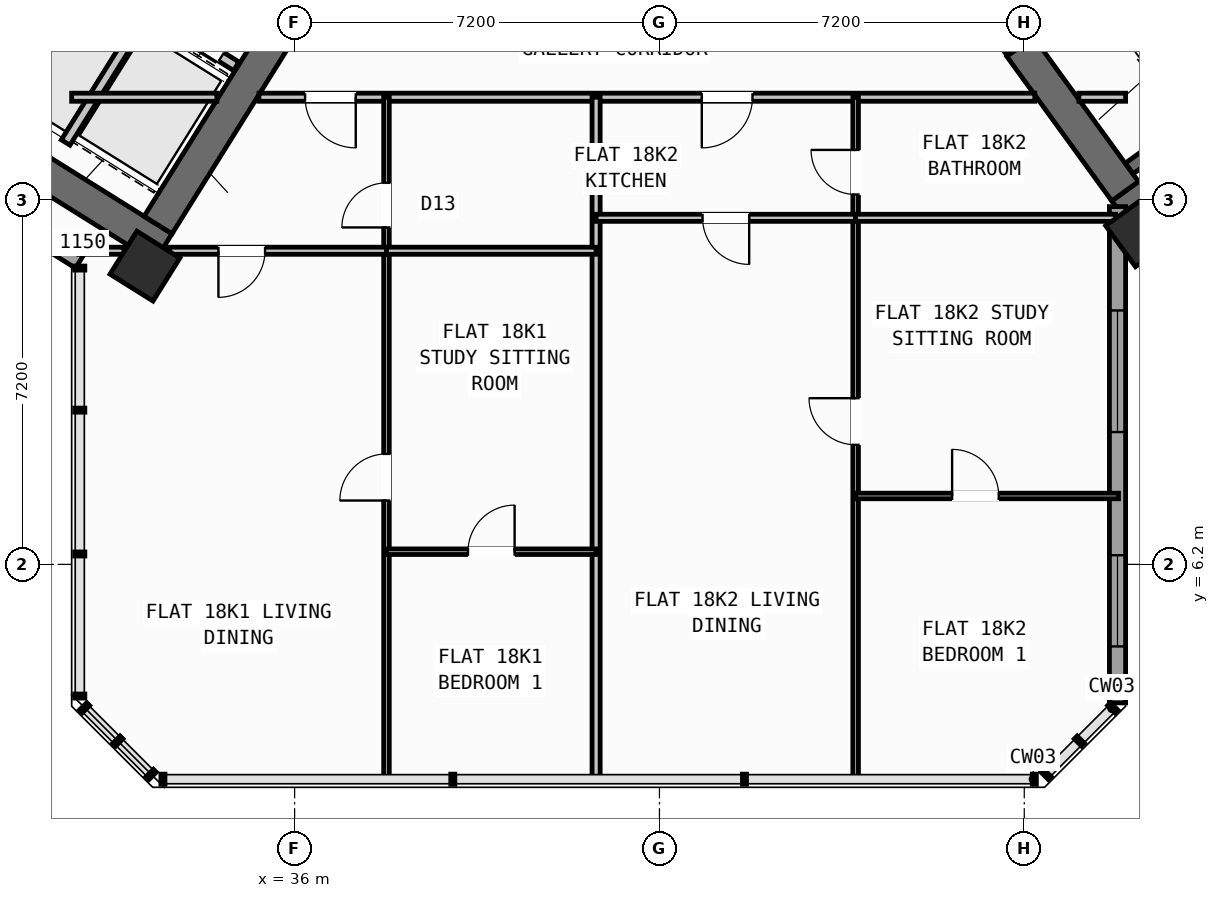
"""IFC4 building model, lengths in metres.
Left out: names, types, materials, properties, quantities, classifications, styles, units other than length and angle.
Written with IfcOpenShell. Run it as: python <this file> out.ifc"""

import sys

from ifc_helpers import new_model, si_unit, direction, frame, frame_2d, origin, origin_2d, place, context, subcontext, project, spatial, rectangle, hollow_rectangle, extrude, source, transform, mapped, element, fill, save


model = new_model("IFC4")
c1 = context("Model", 3, precision=1e-05, world=origin(), true_north=direction((0.0, 1.0)))
c2 = subcontext(c1, "Body", "Model", "MODEL_VIEW")
j1 = project(units=[si_unit("LENGTHUNIT", "METRE"), si_unit("PLANEANGLEUNIT", "RADIAN")], contexts=[c1])
p1 = place(None, origin())
s1 = spatial("IfcSite", under=j1, at=p1, CompositionType="ELEMENT")
p2 = place(p1, origin())
s2 = spatial("IfcBuilding", under=s1, at=p2, CompositionType="ELEMENT")
p3 = place(p2, frame((0.0, 0.0, 71.7)))
s3 = spatial("IfcBuildingStorey", under=s2, at=p3, CompositionType="ELEMENT", Elevation=71.7)
p4 = place(p3, frame((33.409, 12.45, 0.0), z_axis=(0.0, 0.0, 1.0), x_axis=(-0.848051132073, 0.529914405721, 0.0)))
e1 = element("IfcWall", 1, at=p4, inside=s3, PredefinedType="SHEAR", context=c2, shape_type="SweptSolid", body=[
    extrude(rectangle(XDim=13.24, YDim=0.65, at=frame_2d((6.62, 0.0))), origin(), (0.0, 0.0, 1.0), 4.52),
])
p5 = place(p3, frame((36.683, 18.304, 0.0), z_axis=(0.0, 0.0, 1.0), x_axis=(-0.529899109053, -0.848060690178, 0.0)))
e2 = element("IfcWall", 2, at=p5, inside=s3, PredefinedType="SHEAR", context=c2, shape_type="SweptSolid", body=[
    extrude(rectangle(XDim=6.375, YDim=0.65, at=frame_2d((3.188, 0.0))), origin(), (0.0, 0.0, 1.0), 4.52),
])
p6 = place(p3, frame((52.318, 13.11, 0.0), z_axis=(0.0, 0.0, 1.0), x_axis=(0.809019445368, 0.587781878776, 0.0)))
e3 = element("IfcWall", 3, at=p6, inside=s3, PredefinedType="SHEAR", context=c2, shape_type="SweptSolid", body=[
    extrude(rectangle(XDim=12.44, YDim=0.65, at=frame_2d((6.22, 0.0))), origin(), (0.0, 0.0, 1.0), 4.52),
])
p7 = place(p3, frame((52.39, 13.564, 0.0), z_axis=(0.0, 0.0, 1.0), x_axis=(-0.58779688989, 0.809008539037, 0.0)))
e4 = element("IfcWall", 4, at=p7, inside=s3, PredefinedType="SHEAR", context=c2, shape_type="SweptSolid", body=[
    extrude(rectangle(XDim=3.525, YDim=0.65, at=frame_2d((1.763, 0.0))), origin(), (0.0, 0.0, 1.0), 4.52),
])
m1 = source(origin(), c2, "Body", "SweptSolid", [
    extrude(hollow_rectangle(XDim=1.0, YDim=1.0, WallThickness=0.04, at=origin_2d()), origin(), (0.0, 0.0, 1.0), 4.8),
])
for number, where, z_axis, x_axis in (
    (5, (33.046, 12.087, 0.0), (0.0, 0.0, 1.0), (-0.848, 0.53, 0.0)),
    (6, (52.705, 12.773, 0.0), (0.0, 0.0, 1.0), (0.809, 0.588, 0.0)),
):
    element("IfcColumn", number, at=place(p3, frame(where, z_axis=z_axis, x_axis=x_axis)), inside=s3, PredefinedType="COLUMN", context=c2, shape_type="MappedRepresentation", body=[
        mapped(m1, transform((0.0, 0.0, 0.0), scale=1.0)),
    ])
p8 = place(p3, frame((31.76, 12.183, 0.0), z_axis=(0.0, 0.0, 1.0), x_axis=(-0.848047074256, 0.529920899612, 0.0)))
e7 = element("IfcWall", 7, at=p8, inside=s3, PredefinedType="STANDARD", context=c2, shape_type="SweptSolid", body=[
    extrude(rectangle(XDim=30.652, YDim=0.32, at=frame_2d((15.326, 0.0))), origin(), (0.0, 0.0, 1.0), 4.52),
])
p9 = place(p8, frame((20.241, 0.0, 0.0)))
e8 = element("IfcOpeningElement", 8, at=p9, cuts=e7, PredefinedType="OPENING", context=c2, shape_type="SweptSolid", body=[
    extrude(rectangle(XDim=1.2, YDim=2.15, at=frame_2d((0.6, 1.075))), frame((0.0, 0.17, 0.0), z_axis=(0.0, -1.0, 0.0), x_axis=(1.0, 0.0, 0.0)), (0.0, 0.0, 1.0), 0.34),
])
p10 = place(p8, frame((14.781, 0.0, 0.0)))
e9 = element("IfcOpeningElement", 9, at=p10, cuts=e7, PredefinedType="OPENING", context=c2, shape_type="SweptSolid", body=[
    extrude(rectangle(XDim=1.5, YDim=2.25, at=frame_2d((0.75, 1.125))), frame((0.0, 0.17, 0.0), z_axis=(0.0, -1.0, 0.0), x_axis=(1.0, 0.0, 0.0)), (0.0, 0.0, 1.0), 0.34),
])
p11 = place(p8, frame((1.84, 0.0, 0.75)))
e10 = element("IfcOpeningElement", 10, at=p11, cuts=e7, PredefinedType="OPENING", context=c2, shape_type="SweptSolid", body=[
    extrude(rectangle(XDim=2.4, YDim=1.6, at=frame_2d((1.2, 0.8))), frame((0.0, 0.17, 0.0), z_axis=(0.0, -1.0, 0.0), x_axis=(1.0, 0.0, 0.0)), (0.0, 0.0, 1.0), 0.34),
])
p12 = place(p8, frame((7.019, 0.0, 0.75)))
e11 = element("IfcOpeningElement", 11, at=p12, cuts=e7, PredefinedType="OPENING", context=c2, shape_type="SweptSolid", body=[
    extrude(rectangle(XDim=2.4, YDim=1.6, at=frame_2d((1.2, 0.8))), frame((0.0, 0.17, 0.0), z_axis=(0.0, -1.0, 0.0), x_axis=(1.0, 0.0, 0.0)), (0.0, 0.0, 1.0), 0.34),
])
p13 = place(p8, frame((25.841, 0.0, 0.95)))
e12 = element("IfcOpeningElement", 12, at=p13, cuts=e7, PredefinedType="OPENING", context=c2, shape_type="SweptSolid", body=[
    extrude(rectangle(XDim=1.2, YDim=1.4, at=frame_2d((0.6, 0.7))), frame((0.0, 0.17, 0.0), z_axis=(0.0, -1.0, 0.0), x_axis=(1.0, 0.0, 0.0)), (0.0, 0.0, 1.0), 0.34),
])
p14 = place(p3, frame((52.24, 13.261, 0.0), z_axis=(0.0, 0.0, 1.0), x_axis=(0.0, -1.0, 0.0)))
e13 = element("IfcWall", 13, at=p14, inside=s3, PredefinedType="STANDARD", context=c2, shape_type="SweptSolid", body=[
    extrude(rectangle(XDim=9.795, YDim=0.32, at=frame_2d((4.897, 0.0))), origin(), (0.0, 0.0, 1.0), 4.52),
])
p15 = place(p14, frame((2.049, 0.0, 0.75)))
e14 = element("IfcOpeningElement", 14, at=p15, cuts=e13, PredefinedType="OPENING", context=c2, shape_type="SweptSolid", body=[
    extrude(rectangle(XDim=2.4, YDim=1.6, at=frame_2d((1.2, 0.8))), frame((0.0, 0.17, 0.0), z_axis=(0.0, -1.0, 0.0), x_axis=(1.0, 0.0, 0.0)), (0.0, 0.0, 1.0), 0.34),
])
p16 = place(p14, frame((6.88, 0.0, 0.85)))
e15 = element("IfcOpeningElement", 15, at=p16, cuts=e13, PredefinedType="OPENING", context=c2, shape_type="SweptSolid", body=[
    extrude(rectangle(XDim=1.8, YDim=1.5, at=frame_2d((0.9, 0.75))), frame((0.0, 0.17, 0.0), z_axis=(0.0, -1.0, 0.0), x_axis=(1.0, 0.0, 0.0)), (0.0, 0.0, 1.0), 0.34),
])
p17 = place(p3, frame((31.288, 18.256, 0.0), z_axis=(0.0, 0.0, 1.0), x_axis=(-0.529943379326, -0.848033026897, 0.0)))
e16 = element("IfcWall", 16, at=p17, inside=s3, PredefinedType="SHEAR", context=c2, shape_type="SweptSolid", body=[
    extrude(rectangle(XDim=3.16, YDim=0.26, at=frame_2d((1.58, 0.0))), origin(), (0.0, 0.0, 1.0), 4.52),
])
p18 = place(p3, frame((34.848, 16.031, 0.0), z_axis=(0.0, 0.0, 1.0), x_axis=(-0.848044042236, 0.529925751807, 0.0)))
e17 = element("IfcWall", 17, at=p18, inside=s3, PredefinedType="STANDARD", context=c2, shape_type="SweptSolid", body=[
    extrude(rectangle(XDim=4.198, YDim=0.2, at=frame_2d((2.099, 0.0))), origin(), (0.0, 0.0, 1.0), 4.51),
])
p19 = place(p18, frame((0.348, 0.0, 0.0)))
e18 = element("IfcOpeningElement", 18, at=p19, cuts=e17, PredefinedType="OPENING", context=c2, shape_type="SweptSolid", body=[
    extrude(rectangle(XDim=1.3, YDim=2.2, at=frame_2d((0.65, 1.1))), frame((0.0, 0.11, 0.0), z_axis=(0.0, -1.0, 0.0), x_axis=(1.0, 0.0, 0.0)), (0.0, 0.0, 1.0), 0.22),
])
p20 = place(p18, frame((2.423, 0.0, 0.0)))
e19 = element("IfcOpeningElement", 19, at=p20, cuts=e17, PredefinedType="OPENING", context=c2, shape_type="SweptSolid", body=[
    extrude(rectangle(XDim=1.45, YDim=2.25, at=frame_2d((0.725, 1.125))), frame((0.0, 0.11, 0.0), z_axis=(0.0, -1.0, 0.0), x_axis=(1.0, 0.0, 0.0)), (0.0, 0.0, 1.0), 0.22),
])
p21 = place(p3, frame((33.029, 17.003, 0.0), z_axis=(0.0, 0.0, 1.0), x_axis=(-0.529916267533, -0.848049968695, 0.0)))
e20 = element("IfcWall", 20, at=p21, inside=s3, PredefinedType="STANDARD", context=c2, shape_type="SweptSolid", body=[
    extrude(rectangle(XDim=2.92, YDim=0.2, at=frame_2d((1.46, 0.0))), origin(), (0.0, 0.0, 1.0), 4.51),
])
p22 = place(p3, frame((52.472, 14.013, 0.0), z_axis=(0.0, 0.0, 1.0), x_axis=(0.809028366311, 0.587769599847, 0.0)))
e21 = element("IfcWall", 21, at=p22, inside=s3, PredefinedType="SHEAR", context=c2, shape_type="SweptSolid", body=[
    extrude(rectangle(XDim=7.33, YDim=0.26, at=frame_2d((3.665, 0.0))), origin(), (0.0, 0.0, 1.0), 4.52),
])
p23 = place(p3, frame((31.6, 15.42, 0.0), z_axis=(0.0, 0.0, 1.0), x_axis=(1.0, 0.0, 0.0)))
e22 = element("IfcWall", 22, at=p23, inside=s3, PredefinedType="PARTITIONING", context=c2, shape_type="SweptSolid", body=[
    extrude(rectangle(XDim=2.866, YDim=0.16, at=frame_2d((1.433, 0.0))), origin(), (0.0, 0.0, 1.0), 4.51),
])
p24 = place(p3, frame((35.296, 15.42, 0.0), z_axis=(0.0, 0.0, 1.0), x_axis=(1.0, 0.0, 0.0)))
e23 = element("IfcWall", 23, at=p24, inside=s3, PredefinedType="PARTITIONING", context=c2, shape_type="SweptSolid", body=[
    extrude(rectangle(XDim=15.311, YDim=0.16, at=frame_2d((7.655, 0.0))), origin(), (0.0, 0.0, 1.0), 4.51),
])
p25 = place(p24, frame((0.91, 0.0, 0.0)))
e24 = element("IfcOpeningElement", 24, at=p25, cuts=e23, PredefinedType="OPENING", context=c2, shape_type="SweptSolid", body=[
    extrude(rectangle(XDim=1.0, YDim=2.1, at=frame_2d((0.5, 1.05))), frame((0.0, 0.09, 0.0), z_axis=(0.0, -1.0, 0.0), x_axis=(1.0, 0.0, 0.0)), (0.0, 0.0, 1.0), 0.18),
])
p26 = place(p24, frame((8.74, 0.0, 0.0)))
e25 = element("IfcOpeningElement", 25, at=p26, cuts=e23, PredefinedType="OPENING", context=c2, shape_type="SweptSolid", body=[
    extrude(rectangle(XDim=1.0, YDim=2.1, at=frame_2d((0.5, 1.05))), frame((0.0, 0.09, 0.0), z_axis=(0.0, -1.0, 0.0), x_axis=(1.0, 0.0, 0.0)), (0.0, 0.0, 1.0), 0.18),
])
p27 = place(p3, frame((51.477, 15.42, 0.0), z_axis=(0.0, 0.0, 1.0), x_axis=(1.0, 0.0, 0.0)))
e26 = element("IfcWall", 26, at=p27, inside=s3, PredefinedType="PARTITIONING", context=c2, shape_type="SweptSolid", body=[
    extrude(rectangle(XDim=0.923, YDim=0.16, at=frame_2d((0.461, 0.0))), origin(), (0.0, 0.0, 1.0), 4.51),
])
p28 = place(p3, frame((50.119, 16.333, 0.0), z_axis=(0.0, 0.0, 1.0), x_axis=(-0.587749856981, 0.809042709391, 0.0)))
e27 = element("IfcWall", 27, at=p28, inside=s3, PredefinedType="STANDARD", context=c2, shape_type="SweptSolid", body=[
    extrude(rectangle(XDim=2.96, YDim=0.2, at=frame_2d((1.48, 0.0))), origin(), (0.0, 0.0, 1.0), 4.51),
])
p29 = place(p28, frame((0.53, 0.0, 0.0)))
e28 = element("IfcOpeningElement", 28, at=p29, cuts=e27, PredefinedType="OPENING", context=c2, shape_type="SweptSolid", body=[
    extrude(rectangle(XDim=1.5, YDim=2.15, at=frame_2d((0.75, 1.075))), frame((0.0, 0.11, 0.0), z_axis=(0.0, -1.0, 0.0), x_axis=(1.0, 0.0, 0.0)), (0.0, 0.0, 1.0), 0.22),
])
p30 = place(p3, frame((41.95, 1.96, 0.0), z_axis=(0.0, 0.0, 1.0), x_axis=(0.0, 1.0, 0.0)))
e29 = element("IfcWall", 29, at=p30, inside=s3, PredefinedType="PARTITIONING", context=c2, shape_type="SweptSolid", body=[
    extrude(rectangle(XDim=13.46, YDim=0.16, at=frame_2d((6.73, 0.0))), origin(), (0.0, 0.0, 1.0), 4.51),
])
p31 = place(p3, frame((37.813, 1.96, 0.0), z_axis=(0.0, 0.0, 1.0), x_axis=(0.0, 1.0, 0.0)))
e30 = element("IfcWall", 30, at=p31, inside=s3, PredefinedType="PARTITIONING", context=c2, shape_type="SweptSolid", body=[
    extrude(rectangle(XDim=13.46, YDim=0.11, at=frame_2d((6.73, 0.0))), origin(), (0.0, 0.0, 1.0), 4.51),
])
p32 = place(p31, frame((5.5, 0.0, 0.0)))
e31 = element("IfcOpeningElement", 31, at=p32, cuts=e30, PredefinedType="OPENING", context=c2, shape_type="SweptSolid", body=[
    extrude(rectangle(XDim=0.92, YDim=2.08, at=frame_2d((0.46, 1.04))), frame((0.0, 0.065, 0.0), z_axis=(0.0, -1.0, 0.0), x_axis=(1.0, 0.0, 0.0)), (0.0, 0.0, 1.0), 0.13),
])
p33 = place(p31, frame((10.89, 0.0, 0.0)))
e32 = element("IfcOpeningElement", 32, at=p33, cuts=e30, PredefinedType="OPENING", context=c2, shape_type="SweptSolid", body=[
    extrude(rectangle(XDim=0.88, YDim=2.08, at=frame_2d((0.44, 1.04))), frame((0.0, 0.065, 0.0), z_axis=(0.0, -1.0, 0.0), x_axis=(1.0, 0.0, 0.0)), (0.0, 0.0, 1.0), 0.13),
])
p34 = place(p3, frame((31.74, 12.39, 0.0), z_axis=(0.0, 0.0, 1.0), x_axis=(1.0, 0.0, 0.0)))
e33 = element("IfcWall", 33, at=p34, inside=s3, PredefinedType="PLUMBINGWALL", context=c2, shape_type="SweptSolid", body=[
    extrude(rectangle(XDim=0.892, YDim=0.14, at=frame_2d((0.446, 0.0))), origin(), (0.0, 0.0, 1.0), 4.51),
])
p35 = place(p3, frame((33.527, 12.39, 0.0), z_axis=(0.0, 0.0, 1.0), x_axis=(1.0, 0.0, 0.0)))
e34 = element("IfcWall", 34, at=p35, inside=s3, PredefinedType="PLUMBINGWALL", context=c2, shape_type="SweptSolid", body=[
    extrude(rectangle(XDim=4.286, YDim=0.14, at=frame_2d((2.143, 0.0))), origin(), (0.0, 0.0, 1.0), 3.695),
])
p36 = place(p35, frame((0.969, 0.0, 0.0)))
e35 = element("IfcOpeningElement", 35, at=p36, cuts=e34, PredefinedType="OPENING", context=c2, shape_type="SweptSolid", body=[
    extrude(rectangle(XDim=0.92, YDim=2.08, at=frame_2d((0.46, 1.04))), frame((0.0, 0.08, 0.0), z_axis=(0.0, -1.0, 0.0), x_axis=(1.0, 0.0, 0.0)), (0.0, 0.0, 1.0), 0.16),
])
p37 = place(p3, frame((37.813, 12.39, 0.0), z_axis=(0.0, 0.0, 1.0), x_axis=(1.0, 0.0, 0.0)))
e36 = element("IfcWall", 36, at=p37, inside=s3, PredefinedType="PLUMBINGWALL", context=c2, shape_type="SweptSolid", body=[
    extrude(rectangle(XDim=4.137, YDim=0.14, at=frame_2d((2.068, 0.0))), origin(), (0.0, 0.0, 1.0), 3.695),
])
p38 = place(p3, frame((37.813, 6.45, 0.0), z_axis=(0.0, 0.0, 1.0), x_axis=(1.0, 0.0, 0.0)))
e37 = element("IfcWall", 37, at=p38, inside=s3, PredefinedType="PARTITIONING", context=c2, shape_type="SweptSolid", body=[
    extrude(rectangle(XDim=4.137, YDim=0.11, at=frame_2d((2.068, 0.0))), origin(), (0.0, 0.0, 1.0), 4.51),
])
p39 = place(p38, frame((1.608, 0.0, 0.0)))
e38 = element("IfcOpeningElement", 38, at=p39, cuts=e37, PredefinedType="OPENING", context=c2, shape_type="SweptSolid", body=[
    extrude(rectangle(XDim=0.92, YDim=2.08, at=frame_2d((0.46, 1.04))), frame((0.0, 0.065, 0.0), z_axis=(0.0, -1.0, 0.0), x_axis=(1.0, 0.0, 0.0)), (0.0, 0.0, 1.0), 0.13),
])
p40 = place(p3, frame((47.072, 1.96, 0.0), z_axis=(0.0, 0.0, 1.0), x_axis=(0.0, 1.0, 0.0)))
e39 = element("IfcWall", 39, at=p40, inside=s3, PredefinedType="PARTITIONING", context=c2, shape_type="SweptSolid", body=[
    extrude(rectangle(XDim=13.46, YDim=0.11, at=frame_2d((6.73, 0.0))), origin(), (0.0, 0.0, 1.0), 4.51),
])
p41 = place(p40, frame((6.6, 0.0, 0.0)))
e40 = element("IfcOpeningElement", 40, at=p41, cuts=e39, PredefinedType="OPENING", context=c2, shape_type="SweptSolid", body=[
    extrude(rectangle(XDim=0.92, YDim=2.08, at=frame_2d((0.46, 1.04))), frame((0.0, 0.065, 0.0), z_axis=(0.0, -1.0, 0.0), x_axis=(1.0, 0.0, 0.0)), (0.0, 0.0, 1.0), 0.13),
])
p42 = place(p40, frame((11.54, 0.0, 0.0)))
e41 = element("IfcOpeningElement", 41, at=p42, cuts=e39, PredefinedType="OPENING", context=c2, shape_type="SweptSolid", body=[
    extrude(rectangle(XDim=0.88, YDim=2.08, at=frame_2d((0.44, 1.04))), frame((0.0, 0.065, 0.0), z_axis=(0.0, -1.0, 0.0), x_axis=(1.0, 0.0, 0.0)), (0.0, 0.0, 1.0), 0.13),
])
p43 = place(p3, frame((41.95, 13.04, 0.0), z_axis=(0.0, 0.0, 1.0), x_axis=(1.0, 0.0, 0.0)))
e42 = element("IfcWall", 42, at=p43, inside=s3, PredefinedType="PLUMBINGWALL", context=c2, shape_type="SweptSolid", body=[
    extrude(rectangle(XDim=5.122, YDim=0.14, at=frame_2d((2.561, 0.0))), origin(), (0.0, 0.0, 1.0), 4.51),
])
p44 = place(p43, frame((2.101, 0.0, 0.0)))
e43 = element("IfcOpeningElement", 43, at=p44, cuts=e42, PredefinedType="OPENING", context=c2, shape_type="SweptSolid", body=[
    extrude(rectangle(XDim=0.92, YDim=2.08, at=frame_2d((0.46, 1.04))), frame((0.0, 0.08, 0.0), z_axis=(0.0, -1.0, 0.0), x_axis=(1.0, 0.0, 0.0)), (0.0, 0.0, 1.0), 0.16),
])
p45 = place(p3, frame((47.072, 13.04, 0.0), z_axis=(0.0, 0.0, 1.0), x_axis=(1.0, 0.0, 0.0)))
e44 = element("IfcWall", 44, at=p45, inside=s3, PredefinedType="PLUMBINGWALL", context=c2, shape_type="SweptSolid", body=[
    extrude(rectangle(XDim=5.129, YDim=0.14, at=frame_2d((2.564, 0.0))), origin(), (0.0, 0.0, 1.0), 3.695),
])
p46 = place(p3, frame((47.072, 7.55, 0.0), z_axis=(0.0, 0.0, 1.0), x_axis=(1.0, 0.0, 0.0)))
e45 = element("IfcWall", 45, at=p46, inside=s3, PredefinedType="PARTITIONING", context=c2, shape_type="SweptSolid", body=[
    extrude(rectangle(XDim=5.188, YDim=0.11, at=frame_2d((2.594, 0.0))), origin(), (0.0, 0.0, 1.0), 4.51),
])
p47 = place(p46, frame((1.904, 0.0, 0.0)))
e46 = element("IfcOpeningElement", 46, at=p47, cuts=e45, PredefinedType="OPENING", context=c2, shape_type="SweptSolid", body=[
    extrude(rectangle(XDim=0.92, YDim=2.08, at=frame_2d((0.46, 1.04))), frame((0.0, 0.065, 0.0), z_axis=(0.0, -1.0, 0.0), x_axis=(1.0, 0.0, 0.0)), (0.0, 0.0, 1.0), 0.13),
])
m2 = source(origin(), c2, "Body", "SweptSolid", [
    extrude(rectangle(XDim=2.4, YDim=1.6, at=frame_2d((1.2, 0.8))), frame((0.0, 0.03, 0.0), z_axis=(0.0, -1.0, 0.0), x_axis=(1.0, 0.0, 0.0)), (0.0, 0.0, 1.0), 0.06),
])
p48 = place(p15, origin())
e47 = element("IfcWindow", 47, at=p48, inside=s3, PartitioningType="SINGLE_PANEL", PredefinedType="WINDOW", context=c2, shape_type="MappedRepresentation", body=[
    mapped(m2, transform((0.0, 0.0, 0.0), scale=1.0)),
])
fill(e14, e47)
m3 = source(origin(), c2, "Body", "SweptSolid", [
    extrude(rectangle(XDim=1.8, YDim=1.5, at=frame_2d((0.9, 0.75))), frame((0.0, 0.03, 0.0), z_axis=(0.0, -1.0, 0.0), x_axis=(1.0, 0.0, 0.0)), (0.0, 0.0, 1.0), 0.06),
])
p49 = place(p16, origin())
e48 = element("IfcWindow", 48, at=p49, inside=s3, PartitioningType="SINGLE_PANEL", PredefinedType="WINDOW", context=c2, shape_type="MappedRepresentation", body=[
    mapped(m3, transform((0.0, 0.0, 0.0), scale=1.0)),
])
fill(e15, e48)
m4 = source(origin(), c2, "Body", "SweptSolid", [
    extrude(rectangle(XDim=1.3, YDim=2.2, at=frame_2d((0.65, 1.1))), frame((0.0, 0.025, 0.0), z_axis=(0.0, -1.0, 0.0), x_axis=(1.0, 0.0, 0.0)), (0.0, 0.0, 1.0), 0.05),
])
p50 = place(p19, origin())
e49 = element("IfcDoor", 49, at=p50, inside=s3, OperationType="DOUBLE_DOOR_SLIDING", PredefinedType="DOOR", context=c2, shape_type="MappedRepresentation", body=[
    mapped(m4, transform((0.0, 0.0, 0.0), scale=1.0)),
])
fill(e18, e49)
m5 = source(origin(), c2, "Body", "SweptSolid", [
    extrude(rectangle(XDim=0.92, YDim=2.08, at=frame_2d((0.46, 1.04))), frame((0.0, 0.025, 0.0), z_axis=(0.0, -1.0, 0.0), x_axis=(1.0, 0.0, 0.0)), (0.0, 0.0, 1.0), 0.05),
])
p51 = place(p32, origin())
e50 = element("IfcDoor", 50, at=p51, inside=s3, OperationType="SINGLE_SWING_LEFT", PredefinedType="DOOR", context=c2, shape_type="MappedRepresentation", body=[
    mapped(m5, transform((0.0, 0.0, 0.0), scale=1.0)),
])
fill(e31, e50)
p52 = place(p39, origin())
e51 = element("IfcDoor", 51, at=p52, inside=s3, OperationType="SINGLE_SWING_RIGHT", PredefinedType="DOOR", context=c2, shape_type="MappedRepresentation", body=[
    mapped(m5, transform((0.0, 0.0, 0.0), scale=1.0)),
])
fill(e38, e51)
m6 = source(origin(), c2, "Body", "SweptSolid", [
    extrude(rectangle(XDim=1.0, YDim=2.1, at=frame_2d((0.5, 1.05))), frame((0.0, 0.025, 0.0), z_axis=(0.0, -1.0, 0.0), x_axis=(1.0, 0.0, 0.0)), (0.0, 0.0, 1.0), 0.05),
])
p53 = place(p25, frame((1.0, 0.0, 0.0), z_axis=(0.0, 0.0, 1.0), x_axis=(-1.0, 0.0, 0.0)))
e52 = element("IfcDoor", 52, at=p53, inside=s3, OperationType="SINGLE_SWING_LEFT", PredefinedType="DOOR", context=c2, shape_type="MappedRepresentation", body=[
    mapped(m6, transform((0.0, 0.0, 0.0), scale=1.0)),
])
fill(e24, e52)
p54 = place(p36, frame((0.92, 0.0, 0.0), z_axis=(0.0, 0.0, 1.0), x_axis=(-1.0, 0.0, 0.0)))
e53 = element("IfcDoor", 53, at=p54, inside=s3, OperationType="SINGLE_SWING_RIGHT", PredefinedType="DOOR", context=c2, shape_type="MappedRepresentation", body=[
    mapped(m5, transform((0.0, 0.0, 0.0), scale=1.0)),
])
fill(e35, e53)
m7 = source(origin(), c2, "Body", "SweptSolid", [
    extrude(rectangle(XDim=0.88, YDim=2.08, at=frame_2d((0.44, 1.04))), frame((0.0, 0.025, 0.0), z_axis=(0.0, -1.0, 0.0), x_axis=(1.0, 0.0, 0.0)), (0.0, 0.0, 1.0), 0.05),
])
p55 = place(p33, origin())
e54 = element("IfcDoor", 54, at=p55, inside=s3, OperationType="SINGLE_SWING_LEFT", PredefinedType="DOOR", context=c2, shape_type="MappedRepresentation", body=[
    mapped(m7, transform((0.0, 0.0, 0.0), scale=1.0)),
])
fill(e32, e54)
p56 = place(p41, origin())
e55 = element("IfcDoor", 55, at=p56, inside=s3, OperationType="SINGLE_SWING_RIGHT", PredefinedType="DOOR", context=c2, shape_type="MappedRepresentation", body=[
    mapped(m5, transform((0.0, 0.0, 0.0), scale=1.0)),
])
fill(e40, e55)
p57 = place(p47, origin())
e56 = element("IfcDoor", 56, at=p57, inside=s3, OperationType="SINGLE_SWING_LEFT", PredefinedType="DOOR", context=c2, shape_type="MappedRepresentation", body=[
    mapped(m5, transform((0.0, 0.0, 0.0), scale=1.0)),
])
fill(e46, e56)
p58 = place(p26, frame((1.0, 0.0, 0.0), z_axis=(0.0, 0.0, 1.0), x_axis=(-1.0, 0.0, 0.0)))
e57 = element("IfcDoor", 57, at=p58, inside=s3, OperationType="SINGLE_SWING_RIGHT", PredefinedType="DOOR", context=c2, shape_type="MappedRepresentation", body=[
    mapped(m6, transform((0.0, 0.0, 0.0), scale=1.0)),
])
fill(e25, e57)
p59 = place(p44, frame((0.92, 0.0, 0.0), z_axis=(0.0, 0.0, 1.0), x_axis=(-1.0, 0.0, 0.0)))
e58 = element("IfcDoor", 58, at=p59, inside=s3, OperationType="SINGLE_SWING_LEFT", PredefinedType="DOOR", context=c2, shape_type="MappedRepresentation", body=[
    mapped(m5, transform((0.0, 0.0, 0.0), scale=1.0)),
])
fill(e43, e58)
p60 = place(p42, origin())
e59 = element("IfcDoor", 59, at=p60, inside=s3, OperationType="SINGLE_SWING_RIGHT", PredefinedType="DOOR", context=c2, shape_type="MappedRepresentation", body=[
    mapped(m7, transform((0.0, 0.0, 0.0), scale=1.0)),
])
fill(e41, e59)
save(model, sys.argv[1])
